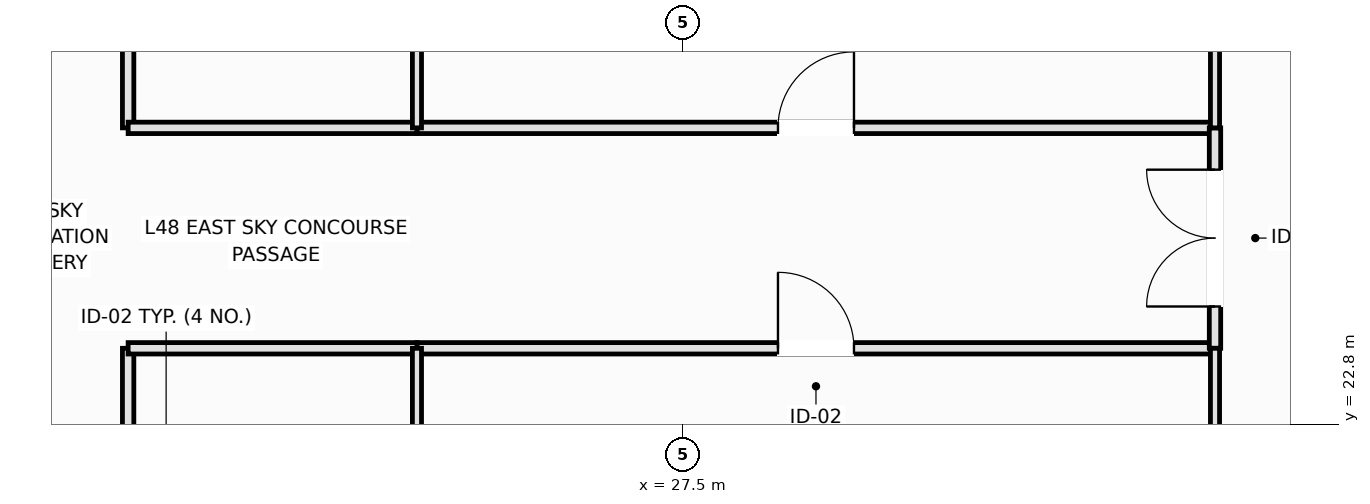
"""IFC4 building model, lengths in metres.
Left out: names, types, materials, properties, quantities, classifications, styles, units other than length and angle.
Written with IfcOpenShell. Run it as: python <this file> out.ifc"""

import sys

from ifc_helpers import new_model, si_unit, direction, frame, frame_2d, origin, place, context, subcontext, project, spatial, rectangle, extrude, element, fill, save


model = new_model("IFC4")
c1 = context("Model", 3, precision=1e-05, world=origin(), true_north=direction((0.0, 1.0)))
c2 = subcontext(c1, "Body", "Model", "MODEL_VIEW")
j1 = project(units=[si_unit("LENGTHUNIT", "METRE"), si_unit("PLANEANGLEUNIT", "RADIAN")], contexts=[c1])
p1 = place(None, origin())
s1 = spatial("IfcSite", under=j1, at=p1, CompositionType="ELEMENT")
p2 = place(p1, origin())
s2 = spatial("IfcBuilding", under=s1, at=p2, CompositionType="ELEMENT")
p3 = place(p2, frame((0.0, 0.0, 183.65)))
s3 = spatial("IfcBuildingStorey", under=s2, at=p3, CompositionType="ELEMENT", Elevation=183.65)
p4 = place(p3, frame((20.2, 20.0, 0.0), z_axis=(0.0, 0.0, 1.0), x_axis=(0.0, 1.0, 0.0)))
e1 = element("IfcWall", 1, at=p4, inside=s3, PredefinedType="PARTITIONING", context=c2, shape_type="SweptSolid", body=[
    extrude(rectangle(XDim=3.8, YDim=0.15, at=frame_2d((1.9, 0.0))), origin(), (0.0, 0.0, 1.0), 4.22),
])
p5 = place(p4, frame((1.4, 0.0, 0.0)))
e2 = element("IfcOpeningElement", 2, at=p5, cuts=e1, PredefinedType="OPENING", context=c2, shape_type="SweptSolid", body=[
    extrude(rectangle(XDim=1.0, YDim=2.15, at=frame_2d((0.5, 1.075))), frame((0.0, 0.085, 0.0), z_axis=(0.0, -1.0, 0.0), x_axis=(1.0, 0.0, 0.0)), (0.0, 0.0, 1.0), 0.17),
])
p6 = place(p3, frame((20.2, 26.7, 0.0), z_axis=(0.0, 0.0, 1.0), x_axis=(0.0, 1.0, 0.0)))
e3 = element("IfcWall", 3, at=p6, inside=s3, PredefinedType="PARTITIONING", context=c2, shape_type="SweptSolid", body=[
    extrude(rectangle(XDim=3.8, YDim=0.15, at=frame_2d((1.9, 0.0))), origin(), (0.0, 0.0, 1.0), 4.22),
])
p7 = place(p6, frame((1.4, 0.0, 0.0)))
e4 = element("IfcOpeningElement", 4, at=p7, cuts=e3, PredefinedType="OPENING", context=c2, shape_type="SweptSolid", body=[
    extrude(rectangle(XDim=1.0, YDim=2.15, at=frame_2d((0.5, 1.075))), frame((0.0, 0.085, 0.0), z_axis=(0.0, -1.0, 0.0), x_axis=(1.0, 0.0, 0.0)), (0.0, 0.0, 1.0), 0.17),
])
p8 = place(p3, frame((24.0, 23.8, 0.0), z_axis=(0.0, 0.0, 1.0), x_axis=(1.0, 0.0, 0.0)))
e5 = element("IfcWall", 5, at=p8, inside=s3, PredefinedType="PARTITIONING", context=c2, shape_type="SweptSolid", body=[
    extrude(rectangle(XDim=10.5, YDim=0.15, at=frame_2d((5.25, 0.0))), origin(), (0.0, 0.0, 1.0), 4.22),
])
p9 = place(p8, frame((4.75, 0.0, 0.0)))
e6 = element("IfcOpeningElement", 6, at=p9, cuts=e5, PredefinedType="OPENING", context=c2, shape_type="SweptSolid", body=[
    extrude(rectangle(XDim=1.0, YDim=2.15, at=frame_2d((0.5, 1.075))), frame((0.0, 0.085, 0.0), z_axis=(0.0, -1.0, 0.0), x_axis=(1.0, 0.0, 0.0)), (0.0, 0.0, 1.0), 0.17),
])
p10 = place(p3, frame((24.0, 26.7, 0.0), z_axis=(0.0, 0.0, 1.0), x_axis=(1.0, 0.0, 0.0)))
e7 = element("IfcWall", 7, at=p10, inside=s3, PredefinedType="PARTITIONING", context=c2, shape_type="SweptSolid", body=[
    extrude(rectangle(XDim=10.5, YDim=0.15, at=frame_2d((5.25, 0.0))), origin(), (0.0, 0.0, 1.0), 4.22),
])
p11 = place(p10, frame((4.75, 0.0, 0.0)))
e8 = element("IfcOpeningElement", 8, at=p11, cuts=e7, PredefinedType="OPENING", context=c2, shape_type="SweptSolid", body=[
    extrude(rectangle(XDim=1.0, YDim=2.15, at=frame_2d((0.5, 1.075))), frame((0.0, 0.085, 0.0), z_axis=(0.0, -1.0, 0.0), x_axis=(1.0, 0.0, 0.0)), (0.0, 0.0, 1.0), 0.17),
])
p12 = place(p3, frame((34.5, 23.8, 0.0), z_axis=(0.0, 0.0, 1.0), x_axis=(0.0, 1.0, 0.0)))
e9 = element("IfcWall", 9, at=p12, inside=s3, PredefinedType="PARTITIONING", context=c2, shape_type="SweptSolid", body=[
    extrude(rectangle(XDim=2.9, YDim=0.15, at=frame_2d((1.45, 0.0))), origin(), (0.0, 0.0, 1.0), 4.22),
])
p13 = place(p12, frame((0.55, 0.0, 0.0)))
e10 = element("IfcOpeningElement", 10, at=p13, cuts=e9, PredefinedType="OPENING", context=c2, shape_type="SweptSolid", body=[
    extrude(rectangle(XDim=1.8, YDim=2.2, at=frame_2d((0.9, 1.1))), frame((0.0, 0.085, 0.0), z_axis=(0.0, -1.0, 0.0), x_axis=(1.0, 0.0, 0.0)), (0.0, 0.0, 1.0), 0.17),
])
for number, where, z_axis, x_axis in (
    (11, (20.2, 23.8, 0.0), (0.0, 0.0, 1.0), (1.0, 0.0, 0.0)),
    (12, (20.2, 26.7, 0.0), (0.0, 0.0, 1.0), (1.0, 0.0, 0.0)),
):
    element("IfcWall", number, at=place(p3, frame(where, z_axis=z_axis, x_axis=x_axis)), inside=s3, PredefinedType="PARTITIONING", context=c2, shape_type="SweptSolid", body=[
        extrude(rectangle(XDim=3.8, YDim=0.15, at=frame_2d((1.9, 0.0))), origin(), (0.0, 0.0, 1.0), 4.22),
    ])
p14 = place(p3, frame((34.5, 14.0, 0.0), z_axis=(0.0, 0.0, 1.0), x_axis=(0.0, 1.0, 0.0)))
e13 = element("IfcWall", 13, at=p14, inside=s3, PredefinedType="PARTITIONING", context=c2, shape_type="SweptSolid", body=[
    extrude(rectangle(XDim=9.8, YDim=0.12, at=frame_2d((4.9, 0.0))), origin(), (0.0, 0.0, 1.0), 4.22),
])
p15 = place(p3, frame((24.0, 20.0, 0.0), z_axis=(0.0, 0.0, 1.0), x_axis=(0.0, 1.0, 0.0)))
e14 = element("IfcWall", 14, at=p15, inside=s3, PredefinedType="PARTITIONING", context=c2, shape_type="SweptSolid", body=[
    extrude(rectangle(XDim=3.8, YDim=0.12, at=frame_2d((1.9, 0.0))), origin(), (0.0, 0.0, 1.0), 4.22),
])
p16 = place(p3, frame((34.5, 26.7, 0.0), z_axis=(0.0, 0.0, 1.0), x_axis=(0.0, 1.0, 0.0)))
e15 = element("IfcWall", 15, at=p16, inside=s3, PredefinedType="PARTITIONING", context=c2, shape_type="SweptSolid", body=[
    extrude(rectangle(XDim=9.8, YDim=0.12, at=frame_2d((4.9, 0.0))), origin(), (0.0, 0.0, 1.0), 4.22),
])
p17 = place(p3, frame((24.0, 26.7, 0.0), z_axis=(0.0, 0.0, 1.0), x_axis=(0.0, 1.0, 0.0)))
e16 = element("IfcWall", 16, at=p17, inside=s3, PredefinedType="PARTITIONING", context=c2, shape_type="SweptSolid", body=[
    extrude(rectangle(XDim=3.8, YDim=0.12, at=frame_2d((1.9, 0.0))), origin(), (0.0, 0.0, 1.0), 4.22),
])
p18 = place(p9, origin())
e17 = element("IfcDoor", 17, at=p18, inside=s3, OperationType="SINGLE_SWING_LEFT", PredefinedType="DOOR", context=c2, shape_type="SweptSolid", body=[
    extrude(rectangle(XDim=1.0, YDim=2.15, at=frame_2d((0.5, 1.075))), frame((0.0, 0.025, 0.0), z_axis=(0.0, -1.0, 0.0), x_axis=(1.0, 0.0, 0.0)), (0.0, 0.0, 1.0), 0.05),
])
fill(e6, e17)
p19 = place(p11, origin())
e18 = element("IfcDoor", 18, at=p19, inside=s3, OperationType="SINGLE_SWING_RIGHT", PredefinedType="DOOR", context=c2, shape_type="SweptSolid", body=[
    extrude(rectangle(XDim=1.0, YDim=2.15, at=frame_2d((0.5, 1.075))), frame((0.0, 0.025, 0.0), z_axis=(0.0, -1.0, 0.0), x_axis=(1.0, 0.0, 0.0)), (0.0, 0.0, 1.0), 0.05),
])
fill(e8, e18)
p20 = place(p13, origin())
e19 = element("IfcDoor", 19, at=p20, inside=s3, OperationType="DOUBLE_DOOR_SINGLE_SWING", PredefinedType="DOOR", context=c2, shape_type="SweptSolid", body=[
    extrude(rectangle(XDim=1.8, YDim=2.2, at=frame_2d((0.9, 1.1))), frame((0.0, 0.025, 0.0), z_axis=(0.0, -1.0, 0.0), x_axis=(1.0, 0.0, 0.0)), (0.0, 0.0, 1.0), 0.05),
])
fill(e10, e19)
save(model, sys.argv[1])
